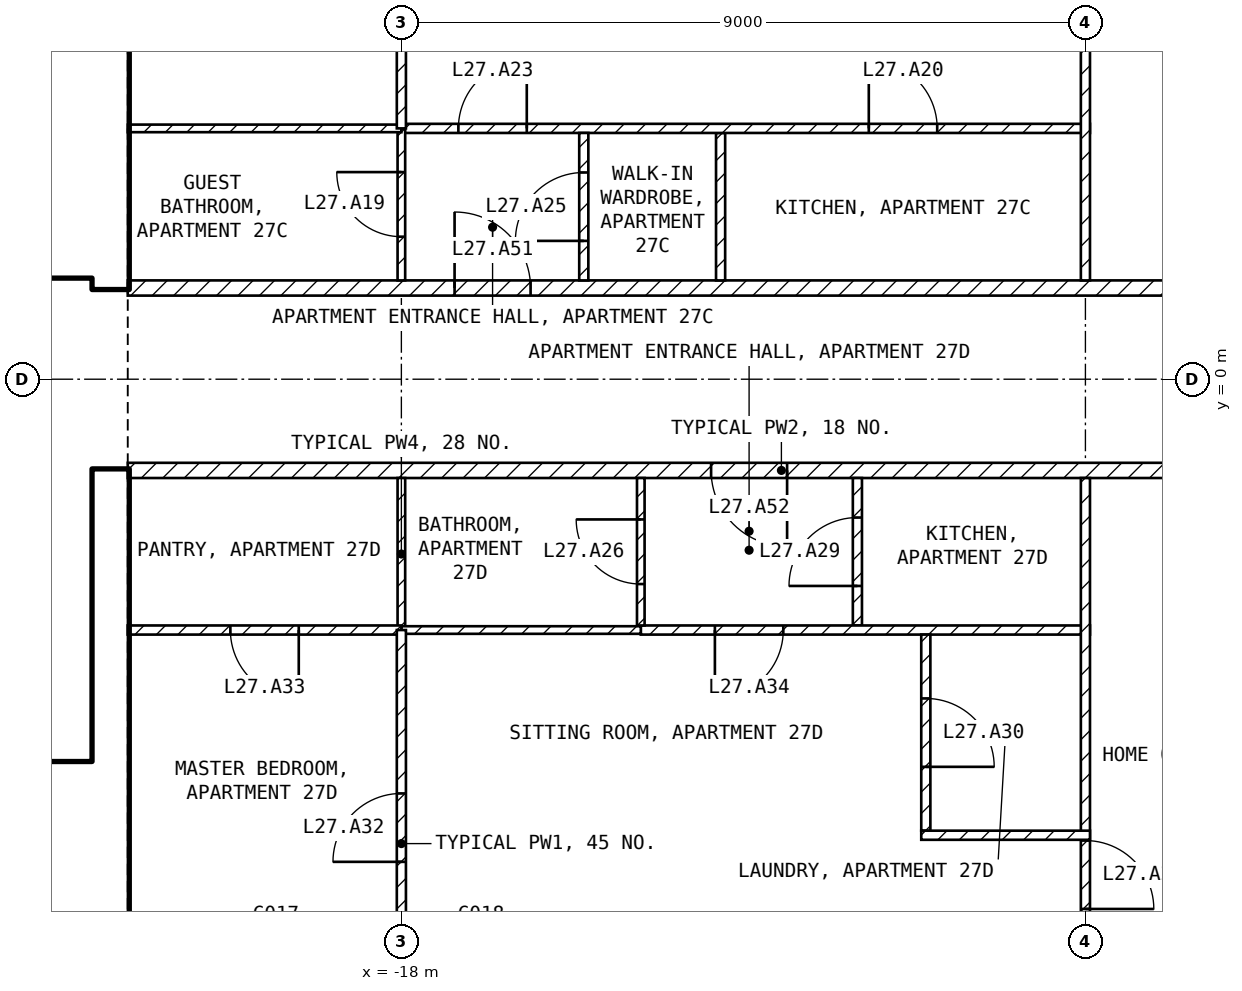
"""IFC4 building model, lengths in metres.
Left out: names, types, materials, properties, quantities, classifications, styles, units other than length and angle.
Written with IfcOpenShell. Run it as: python <this file> out.ifc"""

import sys

from ifc_helpers import new_model, si_unit, direction, frame, frame_2d, origin, place, context, subcontext, project, spatial, rectangle, extrude, element, fill, save


model = new_model("IFC4")
c1 = context("Model", 3, precision=1e-05, world=origin(), true_north=direction((0.0, 1.0)))
c2 = subcontext(c1, "Body", "Model", "MODEL_VIEW")
j1 = project(units=[si_unit("LENGTHUNIT", "METRE"), si_unit("PLANEANGLEUNIT", "RADIAN")], contexts=[c1])
p1 = place(None, origin())
s1 = spatial("IfcSite", under=j1, at=p1, CompositionType="ELEMENT")
p2 = place(p1, origin())
s2 = spatial("IfcBuilding", under=s1, at=p2, CompositionType="ELEMENT")
p3 = place(p2, frame((0.0, 0.0, 116.4)))
s3 = spatial("IfcBuildingStorey", under=s2, at=p3, CompositionType="ELEMENT", Elevation=116.4)
for number, where, z_axis, x_axis in (
    (1, (-21.825, -8.1, 0.0), (0.0, 0.0, 1.0), (0.0, 1.0, 0.0)),
    (2, (-21.825, 1.2, 0.0), (0.0, 0.0, 1.0), (0.0, 1.0, 0.0)),
):
    element("IfcWall", number, at=place(p3, frame(where, z_axis=z_axis, x_axis=x_axis)), inside=s3, PredefinedType="SHEAR", context=c2, shape_type="SweptSolid", body=[
        extrude(rectangle(XDim=6.9, YDim=0.45, at=frame_2d((3.45, 0.0))), origin(), (0.0, 0.0, 1.0), 3.25),
    ])
p4 = place(p3, frame((-33.05, 1.45, 0.0), z_axis=(0.0, 0.0, 1.0), x_axis=(1.0, 0.0, 0.0)))
e3 = element("IfcWall", 3, at=p4, inside=s3, PredefinedType="SOLIDWALL", context=c2, shape_type="SweptSolid", body=[
    extrude(rectangle(XDim=11.0, YDim=0.2, at=frame_2d((5.5, 0.0))), origin(), (0.0, 0.0, 1.0), 3.25),
])
p5 = place(p4, frame((9.25, 0.0, 0.0)))
e4 = element("IfcOpeningElement", 4, at=p5, cuts=e3, PredefinedType="OPENING", context=c2, shape_type="SweptSolid", body=[
    extrude(rectangle(XDim=1.0, YDim=2.1, at=frame_2d((0.5, 1.05))), frame((0.0, 0.11, 0.0), z_axis=(0.0, -1.0, 0.0), x_axis=(1.0, 0.0, 0.0)), (0.0, 0.0, 1.0), 0.22),
])
p6 = place(p4, frame((6.75, 0.0, 0.0)))
e5 = element("IfcOpeningElement", 5, at=p6, cuts=e3, PredefinedType="OPENING", context=c2, shape_type="SweptSolid", body=[
    extrude(rectangle(XDim=1.0, YDim=2.1, at=frame_2d((0.5, 1.05))), frame((0.0, 0.11, 0.0), z_axis=(0.0, -1.0, 0.0), x_axis=(1.0, 0.0, 0.0)), (0.0, 0.0, 1.0), 0.22),
])
p7 = place(p4, frame((1.025, 0.0, 0.0)))
e6 = element("IfcOpeningElement", 6, at=p7, cuts=e3, PredefinedType="OPENING", context=c2, shape_type="SweptSolid", body=[
    extrude(rectangle(XDim=0.9, YDim=2.1, at=frame_2d((0.45, 1.05))), frame((0.0, 0.11, 0.0), z_axis=(0.0, -1.0, 0.0), x_axis=(1.0, 0.0, 0.0)), (0.0, 0.0, 1.0), 0.22),
])
p8 = place(p3, frame((-28.35, -5.15, 0.0), z_axis=(0.0, 0.0, 1.0), x_axis=(1.0, 0.0, 0.0)))
e7 = element("IfcWall", 7, at=p8, inside=s3, PredefinedType="SOLIDWALL", context=c2, shape_type="SweptSolid", body=[
    extrude(rectangle(XDim=6.3, YDim=0.2, at=frame_2d((3.15, 0.0))), origin(), (0.0, 0.0, 1.0), 3.25),
])
p9 = place(p8, frame((5.1, 0.0, 0.0)))
e8 = element("IfcOpeningElement", 8, at=p9, cuts=e7, PredefinedType="OPENING", context=c2, shape_type="SweptSolid", body=[
    extrude(rectangle(XDim=1.0, YDim=2.1, at=frame_2d((0.5, 1.05))), frame((0.0, 0.11, 0.0), z_axis=(0.0, -1.0, 0.0), x_axis=(1.0, 0.0, 0.0)), (0.0, 0.0, 1.0), 0.22),
])
p10 = place(p3, frame((-21.6, 1.2, 0.0), z_axis=(0.0, 0.0, 1.0), x_axis=(1.0, 0.0, 0.0)))
e9 = element("IfcWall", 9, at=p10, inside=s3, PredefinedType="PARTITIONING", context=c2, shape_type="SweptSolid", body=[
    extrude(rectangle(XDim=17.2, YDim=0.2, at=frame_2d((8.6, 0.0))), origin(), (0.0, 0.0, 1.0), 3.25),
])
p11 = place(p10, frame((4.3, 0.0, 0.0)))
e10 = element("IfcOpeningElement", 10, at=p11, cuts=e9, PredefinedType="OPENING", context=c2, shape_type="SweptSolid", body=[
    extrude(rectangle(XDim=1.0, YDim=2.1, at=frame_2d((0.5, 1.05))), frame((0.0, 0.11, 0.0), z_axis=(0.0, -1.0, 0.0), x_axis=(1.0, 0.0, 0.0)), (0.0, 0.0, 1.0), 0.22),
])
p12 = place(p3, frame((-4.4, -1.2, 0.0), z_axis=(0.0, 0.0, 1.0), x_axis=(-1.0, 0.0, 0.0)))
e11 = element("IfcWall", 11, at=p12, inside=s3, PredefinedType="PARTITIONING", context=c2, shape_type="SweptSolid", body=[
    extrude(rectangle(XDim=17.2, YDim=0.2, at=frame_2d((8.6, 0.0))), origin(), (0.0, 0.0, 1.0), 3.25),
])
p13 = place(p12, frame((8.525, 0.0, 0.0)))
e12 = element("IfcOpeningElement", 12, at=p13, cuts=e11, PredefinedType="OPENING", context=c2, shape_type="SweptSolid", body=[
    extrude(rectangle(XDim=1.0, YDim=2.1, at=frame_2d((0.5, 1.05))), frame((0.0, 0.11, 0.0), z_axis=(0.0, -1.0, 0.0), x_axis=(1.0, 0.0, 0.0)), (0.0, 0.0, 1.0), 0.22),
])
p14 = place(p3, frame((-13.8, 1.3, 0.0), z_axis=(0.0, 0.0, 1.0), x_axis=(0.0, 1.0, 0.0)))
e13 = element("IfcWall", 13, at=p14, inside=s3, PredefinedType="PARTITIONING", context=c2, shape_type="SweptSolid", body=[
    extrude(rectangle(XDim=1.94, YDim=0.12, at=frame_2d((0.97, 0.0))), origin(), (0.0, 0.0, 1.0), 3.25),
])
p15 = place(p3, frame((-18.0, 3.3, 0.0), z_axis=(0.0, 0.0, 1.0), x_axis=(1.0, 0.0, 0.0)))
e14 = element("IfcWall", 14, at=p15, inside=s3, PredefinedType="PARTITIONING", context=c2, shape_type="SweptSolid", body=[
    extrude(rectangle(XDim=9.06, YDim=0.12, at=frame_2d((4.53, 0.0))), origin(), (0.0, 0.0, 1.0), 3.25),
])
p16 = place(p15, frame((6.15, 0.0, 0.0)))
e15 = element("IfcOpeningElement", 15, at=p16, cuts=e14, PredefinedType="OPENING", context=c2, shape_type="SweptSolid", body=[
    extrude(rectangle(XDim=0.9, YDim=2.1, at=frame_2d((0.45, 1.05))), frame((0.0, 0.07, 0.0), z_axis=(0.0, -1.0, 0.0), x_axis=(1.0, 0.0, 0.0)), (0.0, 0.0, 1.0), 0.14),
])
p17 = place(p15, frame((0.75, 0.0, 0.0)))
e16 = element("IfcOpeningElement", 16, at=p17, cuts=e14, PredefinedType="OPENING", context=c2, shape_type="SweptSolid", body=[
    extrude(rectangle(XDim=0.9, YDim=2.1, at=frame_2d((0.45, 1.05))), frame((0.0, 0.07, 0.0), z_axis=(0.0, -1.0, 0.0), x_axis=(1.0, 0.0, 0.0)), (0.0, 0.0, 1.0), 0.14),
])
p18 = place(p3, frame((-9.0, 8.92, 0.0), z_axis=(0.0, 0.0, 1.0), x_axis=(0.0, -1.0, 0.0)))
e17 = element("IfcWall", 17, at=p18, inside=s3, PredefinedType="PARTITIONING", context=c2, shape_type="SweptSolid", body=[
    extrude(rectangle(XDim=7.62, YDim=0.12, at=frame_2d((3.81, 0.0))), origin(), (0.0, 0.0, 1.0), 3.25),
])
p19 = place(p18, frame((2.52, 0.0, 0.0)))
e18 = element("IfcOpeningElement", 18, at=p19, cuts=e17, PredefinedType="OPENING", context=c2, shape_type="SweptSolid", body=[
    extrude(rectangle(XDim=0.9, YDim=2.1, at=frame_2d((0.45, 1.05))), frame((0.0, 0.07, 0.0), z_axis=(0.0, -1.0, 0.0), x_axis=(1.0, 0.0, 0.0)), (0.0, 0.0, 1.0), 0.14),
])
p20 = place(p3, frame((-15.6, 1.3, 0.0), z_axis=(0.0, 0.0, 1.0), x_axis=(0.0, 1.0, 0.0)))
e19 = element("IfcWall", 19, at=p20, inside=s3, PredefinedType="PARTITIONING", context=c2, shape_type="SweptSolid", body=[
    extrude(rectangle(XDim=1.94, YDim=0.12, at=frame_2d((0.97, 0.0))), origin(), (0.0, 0.0, 1.0), 3.25),
])
p21 = place(p20, frame((0.52, 0.0, 0.0)))
e20 = element("IfcOpeningElement", 20, at=p21, cuts=e19, PredefinedType="OPENING", context=c2, shape_type="SweptSolid", body=[
    extrude(rectangle(XDim=0.9, YDim=2.1, at=frame_2d((0.45, 1.05))), frame((0.0, 0.07, 0.0), z_axis=(0.0, -1.0, 0.0), x_axis=(1.0, 0.0, 0.0)), (0.0, 0.0, 1.0), 0.14),
])
p22 = place(p3, frame((-18.0, 1.3, 0.0), z_axis=(0.0, 0.0, 1.0), x_axis=(0.0, 1.0, 0.0)))
e21 = element("IfcWall", 21, at=p22, inside=s3, PredefinedType="PARTITIONING", context=c2, shape_type="SweptSolid", body=[
    extrude(rectangle(XDim=2.0, YDim=0.1, at=frame_2d((1.0, 0.0))), origin(), (0.0, 0.0, 1.0), 2.414),
])
p23 = place(p22, frame((0.575, 0.0, 0.0)))
e22 = element("IfcOpeningElement", 22, at=p23, cuts=e21, PredefinedType="OPENING", context=c2, shape_type="SweptSolid", body=[
    extrude(rectangle(XDim=0.85, YDim=2.1, at=frame_2d((0.425, 1.05))), frame((0.0, 0.06, 0.0), z_axis=(0.0, -1.0, 0.0), x_axis=(1.0, 0.0, 0.0)), (0.0, 0.0, 1.0), 0.12),
])
p24 = place(p3, frame((-21.6, 3.3, 0.0), z_axis=(0.0, 0.0, 1.0), x_axis=(1.0, 0.0, 0.0)))
e23 = element("IfcWall", 23, at=p24, inside=s3, PredefinedType="PARTITIONING", context=c2, shape_type="SweptSolid", body=[
    extrude(rectangle(XDim=3.6, YDim=0.1, at=frame_2d((1.8, 0.0))), origin(), (0.0, 0.0, 1.0), 3.25),
])
p25 = place(p3, frame((-18.0, 3.3, 0.0), z_axis=(0.0, 0.0, 1.0), x_axis=(0.0, 1.0, 0.0)))
e24 = element("IfcWall", 24, at=p25, inside=s3, PredefinedType="PARTITIONING", context=c2, shape_type="SweptSolid", body=[
    extrude(rectangle(XDim=5.62, YDim=0.12, at=frame_2d((2.81, 0.0))), origin(), (0.0, 0.0, 1.0), 2.414),
])
p26 = place(p25, frame((2.15, 0.0, 0.0)))
e25 = element("IfcOpeningElement", 25, at=p26, cuts=e24, PredefinedType="OPENING", context=c2, shape_type="SweptSolid", body=[
    extrude(rectangle(XDim=0.9, YDim=2.1, at=frame_2d((0.45, 1.05))), frame((0.0, 0.07, 0.0), z_axis=(0.0, -1.0, 0.0), x_axis=(1.0, 0.0, 0.0)), (0.0, 0.0, 1.0), 0.14),
])
p27 = place(p3, frame((-12.0, -3.24, 0.0), z_axis=(0.0, 0.0, 1.0), x_axis=(0.0, 1.0, 0.0)))
e26 = element("IfcWall", 26, at=p27, inside=s3, PredefinedType="PARTITIONING", context=c2, shape_type="SweptSolid", body=[
    extrude(rectangle(XDim=1.94, YDim=0.12, at=frame_2d((0.97, 0.0))), origin(), (0.0, 0.0, 1.0), 3.25),
])
p28 = place(p27, frame((0.52, 0.0, 0.0)))
e27 = element("IfcOpeningElement", 27, at=p28, cuts=e26, PredefinedType="OPENING", context=c2, shape_type="SweptSolid", body=[
    extrude(rectangle(XDim=0.9, YDim=2.1, at=frame_2d((0.45, 1.05))), frame((0.0, 0.07, 0.0), z_axis=(0.0, -1.0, 0.0), x_axis=(1.0, 0.0, 0.0)), (0.0, 0.0, 1.0), 0.14),
])
p29 = place(p3, frame((-8.94, -3.3, 0.0), z_axis=(0.0, 0.0, 1.0), x_axis=(-1.0, 0.0, 0.0)))
e28 = element("IfcWall", 28, at=p29, inside=s3, PredefinedType="PARTITIONING", context=c2, shape_type="SweptSolid", body=[
    extrude(rectangle(XDim=5.91, YDim=0.12, at=frame_2d((2.955, 0.0))), origin(), (0.0, 0.0, 1.0), 3.25),
])
p30 = place(p29, frame((4.035, 0.0, 0.0)))
e29 = element("IfcOpeningElement", 29, at=p30, cuts=e28, PredefinedType="OPENING", context=c2, shape_type="SweptSolid", body=[
    extrude(rectangle(XDim=0.9, YDim=2.1, at=frame_2d((0.45, 1.05))), frame((0.0, 0.07, 0.0), z_axis=(0.0, -1.0, 0.0), x_axis=(1.0, 0.0, 0.0)), (0.0, 0.0, 1.0), 0.14),
])
p31 = place(p3, frame((-9.0, -1.3, 0.0), z_axis=(0.0, 0.0, 1.0), x_axis=(0.0, -1.0, 0.0)))
e30 = element("IfcWall", 30, at=p31, inside=s3, PredefinedType="PARTITIONING", context=c2, shape_type="SweptSolid", body=[
    extrude(rectangle(XDim=7.62, YDim=0.12, at=frame_2d((3.81, 0.0))), origin(), (0.0, 0.0, 1.0), 3.25),
])
p32 = place(p31, frame((4.77, 0.0, 0.0)))
e31 = element("IfcOpeningElement", 31, at=p32, cuts=e30, PredefinedType="OPENING", context=c2, shape_type="SweptSolid", body=[
    extrude(rectangle(XDim=0.9, YDim=2.1, at=frame_2d((0.45, 1.05))), frame((0.0, 0.07, 0.0), z_axis=(0.0, -1.0, 0.0), x_axis=(1.0, 0.0, 0.0)), (0.0, 0.0, 1.0), 0.14),
])
p33 = place(p3, frame((-14.85, -3.24, 0.0), z_axis=(0.0, 0.0, 1.0), x_axis=(0.0, 1.0, 0.0)))
e32 = element("IfcWall", 32, at=p33, inside=s3, PredefinedType="PARTITIONING", context=c2, shape_type="SweptSolid", body=[
    extrude(rectangle(XDim=1.94, YDim=0.1, at=frame_2d((0.97, 0.0))), origin(), (0.0, 0.0, 1.0), 3.25),
])
p34 = place(p33, frame((0.545, 0.0, 0.0)))
e33 = element("IfcOpeningElement", 33, at=p34, cuts=e32, PredefinedType="OPENING", context=c2, shape_type="SweptSolid", body=[
    extrude(rectangle(XDim=0.85, YDim=2.1, at=frame_2d((0.425, 1.05))), frame((0.0, 0.06, 0.0), z_axis=(0.0, -1.0, 0.0), x_axis=(1.0, 0.0, 0.0)), (0.0, 0.0, 1.0), 0.12),
])
p35 = place(p3, frame((-18.0, -3.3, 0.0), z_axis=(0.0, 0.0, 1.0), x_axis=(0.0, 1.0, 0.0)))
e34 = element("IfcWall", 34, at=p35, inside=s3, PredefinedType="PARTITIONING", context=c2, shape_type="SweptSolid", body=[
    extrude(rectangle(XDim=2.0, YDim=0.1, at=frame_2d((1.0, 0.0))), origin(), (0.0, 0.0, 1.0), 2.414),
])
p36 = place(p3, frame((-14.85, -3.3, 0.0), z_axis=(0.0, 0.0, 1.0), x_axis=(-1.0, 0.0, 0.0)))
e35 = element("IfcWall", 35, at=p36, inside=s3, PredefinedType="PARTITIONING", context=c2, shape_type="SweptSolid", body=[
    extrude(rectangle(XDim=3.15, YDim=0.1, at=frame_2d((1.575, 0.0))), origin(), (0.0, 0.0, 1.0), 3.25),
])
p37 = place(p3, frame((-18.0, -3.3, 0.0), z_axis=(0.0, 0.0, 1.0), x_axis=(-1.0, 0.0, 0.0)))
e36 = element("IfcWall", 36, at=p37, inside=s3, PredefinedType="PARTITIONING", context=c2, shape_type="SweptSolid", body=[
    extrude(rectangle(XDim=3.6, YDim=0.12, at=frame_2d((1.8, 0.0))), origin(), (0.0, 0.0, 1.0), 3.25),
])
p38 = place(p37, frame((1.35, 0.0, 0.0)))
e37 = element("IfcOpeningElement", 37, at=p38, cuts=e36, PredefinedType="OPENING", context=c2, shape_type="SweptSolid", body=[
    extrude(rectangle(XDim=0.9, YDim=2.1, at=frame_2d((0.45, 1.05))), frame((0.0, 0.07, 0.0), z_axis=(0.0, -1.0, 0.0), x_axis=(1.0, 0.0, 0.0)), (0.0, 0.0, 1.0), 0.14),
])
p39 = place(p3, frame((-11.1, -3.36, 0.0), z_axis=(0.0, 0.0, 1.0), x_axis=(0.0, -1.0, 0.0)))
e38 = element("IfcWall", 38, at=p39, inside=s3, PredefinedType="PARTITIONING", context=c2, shape_type="SweptSolid", body=[
    extrude(rectangle(XDim=2.58, YDim=0.12, at=frame_2d((1.29, 0.0))), origin(), (0.0, 0.0, 1.0), 3.25),
])
p40 = place(p39, frame((0.84, 0.0, 0.0)))
e39 = element("IfcOpeningElement", 39, at=p40, cuts=e38, PredefinedType="OPENING", context=c2, shape_type="SweptSolid", body=[
    extrude(rectangle(XDim=0.9, YDim=2.1, at=frame_2d((0.45, 1.05))), frame((0.0, 0.07, 0.0), z_axis=(0.0, -1.0, 0.0), x_axis=(1.0, 0.0, 0.0)), (0.0, 0.0, 1.0), 0.14),
])
p41 = place(p3, frame((-11.16, -6.0, 0.0), z_axis=(0.0, 0.0, 1.0), x_axis=(1.0, 0.0, 0.0)))
e40 = element("IfcWall", 40, at=p41, inside=s3, PredefinedType="PARTITIONING", context=c2, shape_type="SweptSolid", body=[
    extrude(rectangle(XDim=2.22, YDim=0.12, at=frame_2d((1.11, 0.0))), origin(), (0.0, 0.0, 1.0), 3.25),
])
p42 = place(p3, frame((-18.0, -8.92, 0.0), z_axis=(0.0, 0.0, 1.0), x_axis=(0.0, 1.0, 0.0)))
e41 = element("IfcWall", 41, at=p42, inside=s3, PredefinedType="PARTITIONING", context=c2, shape_type="SweptSolid", body=[
    extrude(rectangle(XDim=5.62, YDim=0.12, at=frame_2d((2.81, 0.0))), origin(), (0.0, 0.0, 1.0), 2.414),
])
p43 = place(p42, frame((2.57, 0.0, 0.0)))
e42 = element("IfcOpeningElement", 42, at=p43, cuts=e41, PredefinedType="OPENING", context=c2, shape_type="SweptSolid", body=[
    extrude(rectangle(XDim=0.9, YDim=2.1, at=frame_2d((0.45, 1.05))), frame((0.0, 0.07, 0.0), z_axis=(0.0, -1.0, 0.0), x_axis=(1.0, 0.0, 0.0)), (0.0, 0.0, 1.0), 0.14),
])
p44 = place(p9, origin())
e43 = element("IfcDoor", 43, at=p44, inside=s3, OperationType="SINGLE_SWING_LEFT", PredefinedType="DOOR", context=c2, shape_type="SweptSolid", body=[
    extrude(rectangle(XDim=1.0, YDim=2.1, at=frame_2d((0.5, 1.05))), frame((0.0, 0.025, 0.0), z_axis=(0.0, -1.0, 0.0), x_axis=(1.0, 0.0, 0.0)), (0.0, 0.0, 1.0), 0.05),
])
fill(e8, e43)
p45 = place(p23, origin())
e44 = element("IfcDoor", 44, at=p45, inside=s3, OperationType="SINGLE_SWING_RIGHT", PredefinedType="DOOR", context=c2, shape_type="SweptSolid", body=[
    extrude(rectangle(XDim=0.85, YDim=2.1, at=frame_2d((0.425, 1.05))), frame((0.0, 0.025, 0.0), z_axis=(0.0, -1.0, 0.0), x_axis=(1.0, 0.0, 0.0)), (0.0, 0.0, 1.0), 0.05),
])
fill(e22, e44)
p46 = place(p16, origin())
e45 = element("IfcDoor", 45, at=p46, inside=s3, OperationType="SINGLE_SWING_LEFT", PredefinedType="DOOR", context=c2, shape_type="SweptSolid", body=[
    extrude(rectangle(XDim=0.9, YDim=2.1, at=frame_2d((0.45, 1.05))), frame((0.0, 0.025, 0.0), z_axis=(0.0, -1.0, 0.0), x_axis=(1.0, 0.0, 0.0)), (0.0, 0.0, 1.0), 0.05),
])
fill(e15, e45)
p47 = place(p17, origin())
e46 = element("IfcDoor", 46, at=p47, inside=s3, OperationType="SINGLE_SWING_RIGHT", PredefinedType="DOOR", context=c2, shape_type="SweptSolid", body=[
    extrude(rectangle(XDim=0.9, YDim=2.1, at=frame_2d((0.45, 1.05))), frame((0.0, 0.025, 0.0), z_axis=(0.0, -1.0, 0.0), x_axis=(1.0, 0.0, 0.0)), (0.0, 0.0, 1.0), 0.05),
])
fill(e16, e46)
p48 = place(p21, origin())
e47 = element("IfcDoor", 47, at=p48, inside=s3, OperationType="SINGLE_SWING_LEFT", PredefinedType="DOOR", context=c2, shape_type="SweptSolid", body=[
    extrude(rectangle(XDim=0.9, YDim=2.1, at=frame_2d((0.45, 1.05))), frame((0.0, 0.025, 0.0), z_axis=(0.0, -1.0, 0.0), x_axis=(1.0, 0.0, 0.0)), (0.0, 0.0, 1.0), 0.05),
])
fill(e20, e47)
p49 = place(p34, origin())
e48 = element("IfcDoor", 48, at=p49, inside=s3, OperationType="SINGLE_SWING_RIGHT", PredefinedType="DOOR", context=c2, shape_type="SweptSolid", body=[
    extrude(rectangle(XDim=0.85, YDim=2.1, at=frame_2d((0.425, 1.05))), frame((0.0, 0.025, 0.0), z_axis=(0.0, -1.0, 0.0), x_axis=(1.0, 0.0, 0.0)), (0.0, 0.0, 1.0), 0.05),
])
fill(e33, e48)
p50 = place(p32, origin())
e49 = element("IfcDoor", 49, at=p50, inside=s3, OperationType="SINGLE_SWING_RIGHT", PredefinedType="DOOR", context=c2, shape_type="SweptSolid", body=[
    extrude(rectangle(XDim=0.9, YDim=2.1, at=frame_2d((0.45, 1.05))), frame((0.0, 0.025, 0.0), z_axis=(0.0, -1.0, 0.0), x_axis=(1.0, 0.0, 0.0)), (0.0, 0.0, 1.0), 0.05),
])
fill(e31, e49)
p51 = place(p28, origin())
e50 = element("IfcDoor", 50, at=p51, inside=s3, OperationType="SINGLE_SWING_LEFT", PredefinedType="DOOR", context=c2, shape_type="SweptSolid", body=[
    extrude(rectangle(XDim=0.9, YDim=2.1, at=frame_2d((0.45, 1.05))), frame((0.0, 0.025, 0.0), z_axis=(0.0, -1.0, 0.0), x_axis=(1.0, 0.0, 0.0)), (0.0, 0.0, 1.0), 0.05),
])
fill(e27, e50)
p52 = place(p40, origin())
e51 = element("IfcDoor", 51, at=p52, inside=s3, OperationType="SINGLE_SWING_RIGHT", PredefinedType="DOOR", context=c2, shape_type="SweptSolid", body=[
    extrude(rectangle(XDim=0.9, YDim=2.1, at=frame_2d((0.45, 1.05))), frame((0.0, 0.025, 0.0), z_axis=(0.0, -1.0, 0.0), x_axis=(1.0, 0.0, 0.0)), (0.0, 0.0, 1.0), 0.05),
])
fill(e39, e51)
p53 = place(p43, origin())
e52 = element("IfcDoor", 52, at=p53, inside=s3, OperationType="SINGLE_SWING_LEFT", PredefinedType="DOOR", context=c2, shape_type="SweptSolid", body=[
    extrude(rectangle(XDim=0.9, YDim=2.1, at=frame_2d((0.45, 1.05))), frame((0.0, 0.025, 0.0), z_axis=(0.0, -1.0, 0.0), x_axis=(1.0, 0.0, 0.0)), (0.0, 0.0, 1.0), 0.05),
])
fill(e42, e52)
p54 = place(p38, origin())
e53 = element("IfcDoor", 53, at=p54, inside=s3, OperationType="SINGLE_SWING_LEFT", PredefinedType="DOOR", context=c2, shape_type="SweptSolid", body=[
    extrude(rectangle(XDim=0.9, YDim=2.1, at=frame_2d((0.45, 1.05))), frame((0.0, 0.025, 0.0), z_axis=(0.0, -1.0, 0.0), x_axis=(1.0, 0.0, 0.0)), (0.0, 0.0, 1.0), 0.05),
])
fill(e37, e53)
p55 = place(p30, origin())
e54 = element("IfcDoor", 54, at=p55, inside=s3, OperationType="SINGLE_SWING_RIGHT", PredefinedType="DOOR", context=c2, shape_type="SweptSolid", body=[
    extrude(rectangle(XDim=0.9, YDim=2.1, at=frame_2d((0.45, 1.05))), frame((0.0, 0.025, 0.0), z_axis=(0.0, -1.0, 0.0), x_axis=(1.0, 0.0, 0.0)), (0.0, 0.0, 1.0), 0.05),
])
fill(e29, e54)
p56 = place(p11, origin())
e55 = element("IfcDoor", 55, at=p56, inside=s3, OperationType="SINGLE_SWING_LEFT", PredefinedType="DOOR", context=c2, shape_type="SweptSolid", body=[
    extrude(rectangle(XDim=1.0, YDim=2.1, at=frame_2d((0.5, 1.05))), frame((0.0, 0.025, 0.0), z_axis=(0.0, -1.0, 0.0), x_axis=(1.0, 0.0, 0.0)), (0.0, 0.0, 1.0), 0.05),
])
fill(e10, e55)
p57 = place(p13, origin())
e56 = element("IfcDoor", 56, at=p57, inside=s3, OperationType="SINGLE_SWING_LEFT", PredefinedType="DOOR", context=c2, shape_type="SweptSolid", body=[
    extrude(rectangle(XDim=1.0, YDim=2.1, at=frame_2d((0.5, 1.05))), frame((0.0, 0.025, 0.0), z_axis=(0.0, -1.0, 0.0), x_axis=(1.0, 0.0, 0.0)), (0.0, 0.0, 1.0), 0.05),
])
fill(e12, e56)
save(model, sys.argv[1])
